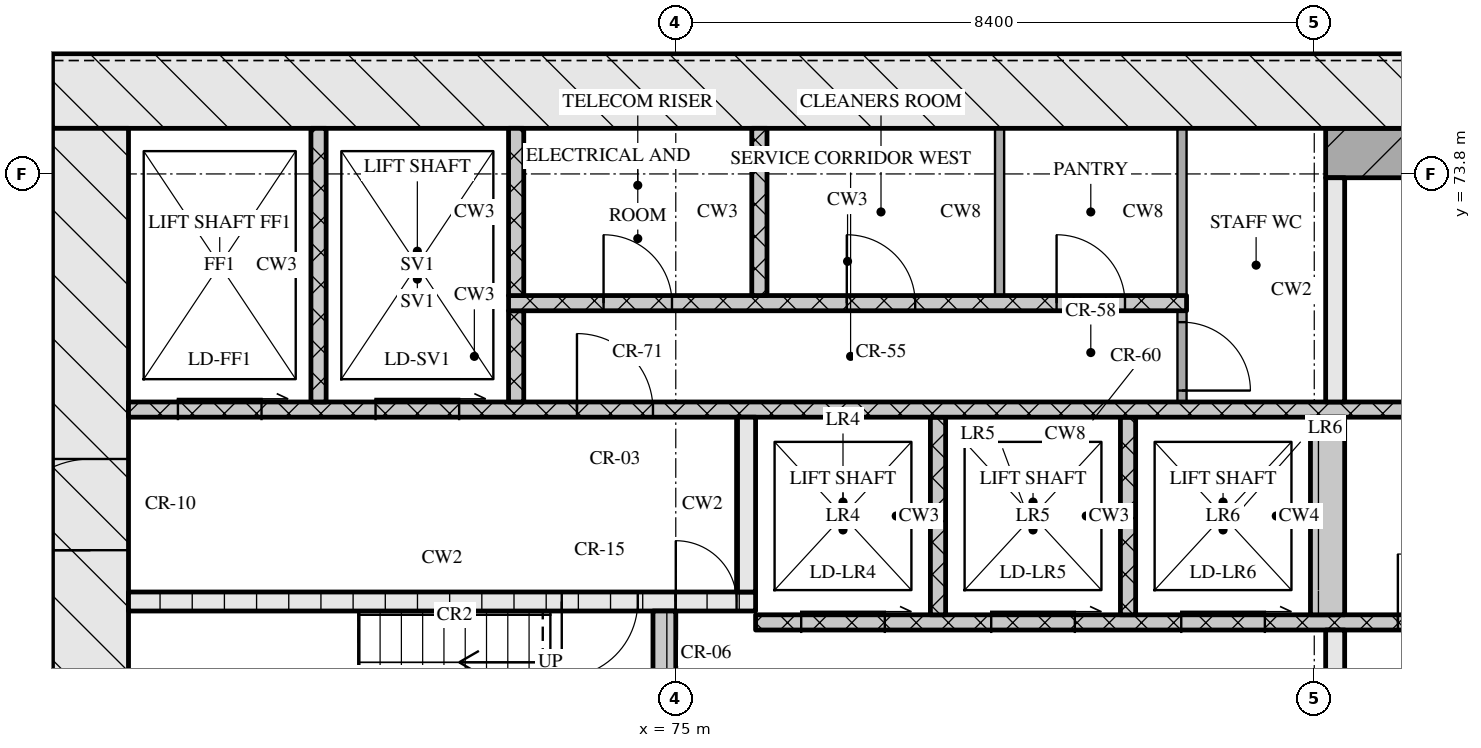
"""IFC4 building model, lengths in metres.
Left out: names, types, materials, properties, quantities, classifications, styles, units other than length and angle.
Written with IfcOpenShell. Run it as: python <this file> out.ifc"""

import sys

from ifc_helpers import new_model, si_unit, direction, frame, frame_2d, origin, place, context, subcontext, project, spatial, rectangle, extrude, element, fill, save


model = new_model("IFC4")
c1 = context("Model", 3, precision=1e-05, world=origin(), true_north=direction((0.0, 1.0)))
c2 = subcontext(c1, "Body", "Model", "MODEL_VIEW")
j1 = project(units=[si_unit("LENGTHUNIT", "METRE"), si_unit("PLANEANGLEUNIT", "RADIAN")], contexts=[c1])
p1 = place(None, origin())
s1 = spatial("IfcSite", under=j1, at=p1, CompositionType="ELEMENT")
p2 = place(p1, origin())
s2 = spatial("IfcBuilding", under=s1, at=p2, CompositionType="ELEMENT")
p3 = place(p2, frame((0.0, 0.0, 102.45)))
s3 = spatial("IfcBuildingStorey", under=s2, at=p3, CompositionType="ELEMENT", Elevation=102.45)
p4 = place(p3, frame((66.8, 74.9, 0.0), z_axis=(0.0, 0.0, 1.0), x_axis=(1.0, 0.0, 0.0)))
e1 = element("IfcWall", 1, at=p4, inside=s3, PredefinedType="SOLIDWALL", context=c2, shape_type="SweptSolid", body=[
    extrude(rectangle(XDim=41.6, YDim=1.0, at=frame_2d((20.8, 0.0))), origin(), (0.0, 0.0, 1.0), 3.32),
])
p5 = place(p3, frame((67.3, 62.4, 0.0), z_axis=(0.0, 0.0, 1.0), x_axis=(0.0, 1.0, 0.0)))
e2 = element("IfcWall", 2, at=p5, inside=s3, PredefinedType="SOLIDWALL", context=c2, shape_type="SweptSolid", body=[
    extrude(rectangle(XDim=12.0, YDim=1.0, at=frame_2d((6.0, 0.0))), origin(), (0.0, 0.0, 1.0), 3.32),
])
p6 = place(p5, frame((6.45, 0.0, 0.0)))
e3 = element("IfcOpeningElement", 3, at=p6, cuts=e2, PredefinedType="OPENING", context=c2, shape_type="SweptSolid", body=[
    extrude(rectangle(XDim=1.2, YDim=2.1, at=frame_2d((0.6, 1.05))), frame((0.0, 0.51, 0.0), z_axis=(0.0, -1.0, 0.0), x_axis=(1.0, 0.0, 0.0)), (0.0, 0.0, 1.0), 1.02),
])
p7 = place(p3, frame((74.85, 65.2, 0.0), z_axis=(0.0, 0.0, 1.0), x_axis=(0.0, 1.0, 0.0)))
e4 = element("IfcWall", 4, at=p7, inside=s3, PredefinedType="SOLIDWALL", context=c2, shape_type="SweptSolid", body=[
    extrude(rectangle(XDim=2.85, YDim=0.3, at=frame_2d((1.425, 0.0))), origin(), (0.0, 0.0, 1.0), 3.32),
])
p8 = place(p3, frame((83.675, 65.2, 0.0), z_axis=(0.0, 0.0, 1.0), x_axis=(0.0, 1.0, 0.0)))
e5 = element("IfcWall", 5, at=p8, inside=s3, PredefinedType="SOLIDWALL", context=c2, shape_type="SweptSolid", body=[
    extrude(rectangle(XDim=2.6, YDim=0.25, at=frame_2d((1.3, 0.0))), origin(), (0.0, 0.0, 1.0), 3.32),
])
p9 = place(p8, frame((0.7, 0.0, 0.0)))
e6 = element("IfcOpeningElement", 6, at=p9, cuts=e5, PredefinedType="OPENING", context=c2, shape_type="SweptSolid", body=[
    extrude(rectangle(XDim=1.2, YDim=2.1, at=frame_2d((0.6, 1.05))), frame((0.0, 0.135, 0.0), z_axis=(0.0, -1.0, 0.0), x_axis=(1.0, 0.0, 0.0)), (0.0, 0.0, 1.0), 0.27),
])
p10 = place(p3, frame((76.05, 67.9, 0.0), z_axis=(0.0, 0.0, 1.0), x_axis=(1.0, 0.0, 0.0)))
e7 = element("IfcWall", 7, at=p10, inside=s3, PredefinedType="SOLIDWALL", context=c2, shape_type="SweptSolid", body=[
    extrude(rectangle(XDim=23.1, YDim=0.2, at=frame_2d((11.55, 0.0))), origin(), (0.0, 0.0, 1.0), 3.32),
])
p11 = place(p10, frame((0.6, 0.0, 0.0)))
e8 = element("IfcOpeningElement", 8, at=p11, cuts=e7, PredefinedType="OPENING", context=c2, shape_type="SweptSolid", body=[
    extrude(rectangle(XDim=1.1, YDim=2.1, at=frame_2d((0.55, 1.05))), frame((0.0, 0.11, 0.0), z_axis=(0.0, -1.0, 0.0), x_axis=(1.0, 0.0, 0.0)), (0.0, 0.0, 1.0), 0.22),
])
p12 = place(p10, frame((3.1, 0.0, 0.0)))
e9 = element("IfcOpeningElement", 9, at=p12, cuts=e7, PredefinedType="OPENING", context=c2, shape_type="SweptSolid", body=[
    extrude(rectangle(XDim=1.1, YDim=2.1, at=frame_2d((0.55, 1.05))), frame((0.0, 0.11, 0.0), z_axis=(0.0, -1.0, 0.0), x_axis=(1.0, 0.0, 0.0)), (0.0, 0.0, 1.0), 0.22),
])
p13 = place(p10, frame((5.6, 0.0, 0.0)))
e10 = element("IfcOpeningElement", 10, at=p13, cuts=e7, PredefinedType="OPENING", context=c2, shape_type="SweptSolid", body=[
    extrude(rectangle(XDim=1.1, YDim=2.1, at=frame_2d((0.55, 1.05))), frame((0.0, 0.11, 0.0), z_axis=(0.0, -1.0, 0.0), x_axis=(1.0, 0.0, 0.0)), (0.0, 0.0, 1.0), 0.22),
])
p14 = place(p10, frame((8.45, 0.0, 0.0)))
e11 = element("IfcOpeningElement", 11, at=p14, cuts=e7, PredefinedType="OPENING", context=c2, shape_type="SweptSolid", body=[
    extrude(rectangle(XDim=0.9, YDim=2.1, at=frame_2d((0.45, 1.05))), frame((0.0, 0.11, 0.0), z_axis=(0.0, -1.0, 0.0), x_axis=(1.0, 0.0, 0.0)), (0.0, 0.0, 1.0), 0.22),
])
p15 = place(p10, frame((10.91, 0.0, 0.0)))
e12 = element("IfcOpeningElement", 12, at=p15, cuts=e7, PredefinedType="OPENING", context=c2, shape_type="SweptSolid", body=[
    extrude(rectangle(XDim=0.9, YDim=2.1, at=frame_2d((0.45, 1.05))), frame((0.0, 0.11, 0.0), z_axis=(0.0, -1.0, 0.0), x_axis=(1.0, 0.0, 0.0)), (0.0, 0.0, 1.0), 0.22),
])
p16 = place(p10, frame((13.55, 0.0, 0.0)))
e13 = element("IfcOpeningElement", 13, at=p16, cuts=e7, PredefinedType="OPENING", context=c2, shape_type="SweptSolid", body=[
    extrude(rectangle(XDim=1.0, YDim=2.1, at=frame_2d((0.5, 1.05))), frame((0.0, 0.11, 0.0), z_axis=(0.0, -1.0, 0.0), x_axis=(1.0, 0.0, 0.0)), (0.0, 0.0, 1.0), 0.22),
])
for number, where, z_axis, x_axis in (
    (14, (78.45, 68.0, 0.0), (0.0, 0.0, 1.0), (0.0, 1.0, 0.0)),
    (15, (80.95, 68.0, 0.0), (0.0, 0.0, 1.0), (0.0, 1.0, 0.0)),
):
    element("IfcWall", number, at=place(p3, frame(where, z_axis=z_axis, x_axis=x_axis)), inside=s3, PredefinedType="SOLIDWALL", context=c2, shape_type="SweptSolid", body=[
        extrude(rectangle(XDim=2.6, YDim=0.2, at=frame_2d((1.3, 0.0))), origin(), (0.0, 0.0, 1.0), 3.32),
    ])
p17 = place(p3, frame((83.575, 68.0, 0.0), z_axis=(0.0, 0.0, 1.0), x_axis=(0.0, 1.0, 0.0)))
e16 = element("IfcWall", 16, at=p17, inside=s3, PredefinedType="SOLIDWALL", context=c2, shape_type="SweptSolid", body=[
    extrude(rectangle(XDim=2.6, YDim=0.45, at=frame_2d((1.3, 0.0))), origin(), (0.0, 0.0, 1.0), 3.32),
])
p18 = place(p3, frame((67.8, 68.175, 0.0), z_axis=(0.0, 0.0, 1.0), x_axis=(1.0, 0.0, 0.0)))
e17 = element("IfcWall", 17, at=p18, inside=s3, PredefinedType="SOLIDWALL", context=c2, shape_type="SweptSolid", body=[
    extrude(rectangle(XDim=8.25, YDim=0.25, at=frame_2d((4.125, 0.0))), origin(), (0.0, 0.0, 1.0), 3.32),
])
p19 = place(p18, frame((5.7, 0.0, 0.0)))
e18 = element("IfcOpeningElement", 18, at=p19, cuts=e17, PredefinedType="OPENING", context=c2, shape_type="SweptSolid", body=[
    extrude(rectangle(XDim=1.0, YDim=2.1, at=frame_2d((0.5, 1.05))), frame((0.0, 0.135, 0.0), z_axis=(0.0, -1.0, 0.0), x_axis=(1.0, 0.0, 0.0)), (0.0, 0.0, 1.0), 0.27),
])
p20 = place(p18, frame((7.2, 0.0, 0.0)))
e19 = element("IfcOpeningElement", 19, at=p20, cuts=e17, PredefinedType="OPENING", context=c2, shape_type="SweptSolid", body=[
    extrude(rectangle(XDim=0.8, YDim=2.1, at=frame_2d((0.4, 1.05))), frame((0.0, 0.135, 0.0), z_axis=(0.0, -1.0, 0.0), x_axis=(1.0, 0.0, 0.0)), (0.0, 0.0, 1.0), 0.27),
])
p21 = place(p3, frame((75.925, 68.3, 0.0), z_axis=(0.0, 0.0, 1.0), x_axis=(0.0, 1.0, 0.0)))
e20 = element("IfcWall", 20, at=p21, inside=s3, PredefinedType="SOLIDWALL", context=c2, shape_type="SweptSolid", body=[
    extrude(rectangle(XDim=2.3, YDim=0.25, at=frame_2d((1.15, 0.0))), origin(), (0.0, 0.0, 1.0), 3.32),
])
p22 = place(p3, frame((67.8, 70.7, 0.0), z_axis=(0.0, 0.0, 1.0), x_axis=(1.0, 0.0, 0.0)))
e21 = element("IfcWall", 21, at=p22, inside=s3, PredefinedType="SOLIDWALL", context=c2, shape_type="SweptSolid", body=[
    extrude(rectangle(XDim=39.6, YDim=0.2, at=frame_2d((19.8, 0.0))), origin(), (0.0, 0.0, 1.0), 3.32),
])
p23 = place(p22, frame((0.65, 0.0, 0.0)))
e22 = element("IfcOpeningElement", 22, at=p23, cuts=e21, PredefinedType="OPENING", context=c2, shape_type="SweptSolid", body=[
    extrude(rectangle(XDim=1.1, YDim=2.1, at=frame_2d((0.55, 1.05))), frame((0.0, 0.11, 0.0), z_axis=(0.0, -1.0, 0.0), x_axis=(1.0, 0.0, 0.0)), (0.0, 0.0, 1.0), 0.22),
])
p24 = place(p22, frame((3.25, 0.0, 0.0)))
e23 = element("IfcOpeningElement", 23, at=p24, cuts=e21, PredefinedType="OPENING", context=c2, shape_type="SweptSolid", body=[
    extrude(rectangle(XDim=1.1, YDim=2.1, at=frame_2d((0.55, 1.05))), frame((0.0, 0.11, 0.0), z_axis=(0.0, -1.0, 0.0), x_axis=(1.0, 0.0, 0.0)), (0.0, 0.0, 1.0), 0.22),
])
p25 = place(p22, frame((5.9, 0.0, 0.0)))
e24 = element("IfcOpeningElement", 24, at=p25, cuts=e21, PredefinedType="OPENING", context=c2, shape_type="SweptSolid", body=[
    extrude(rectangle(XDim=1.0, YDim=2.1, at=frame_2d((0.5, 1.05))), frame((0.0, 0.11, 0.0), z_axis=(0.0, -1.0, 0.0), x_axis=(1.0, 0.0, 0.0)), (0.0, 0.0, 1.0), 0.22),
])
p26 = place(p22, frame((21.7, 0.0, 0.0)))
e25 = element("IfcOpeningElement", 25, at=p26, cuts=e21, PredefinedType="OPENING", context=c2, shape_type="SweptSolid", body=[
    extrude(rectangle(XDim=1.0, YDim=2.1, at=frame_2d((0.5, 1.05))), frame((0.0, 0.11, 0.0), z_axis=(0.0, -1.0, 0.0), x_axis=(1.0, 0.0, 0.0)), (0.0, 0.0, 1.0), 0.22),
])
p27 = place(p22, frame((32.7, 0.0, 0.0)))
e26 = element("IfcOpeningElement", 26, at=p27, cuts=e21, PredefinedType="OPENING", context=c2, shape_type="SweptSolid", body=[
    extrude(rectangle(XDim=1.0, YDim=2.1, at=frame_2d((0.5, 1.05))), frame((0.0, 0.11, 0.0), z_axis=(0.0, -1.0, 0.0), x_axis=(1.0, 0.0, 0.0)), (0.0, 0.0, 1.0), 0.22),
])
p28 = place(p22, frame((35.25, 0.0, 0.0)))
e27 = element("IfcOpeningElement", 27, at=p28, cuts=e21, PredefinedType="OPENING", context=c2, shape_type="SweptSolid", body=[
    extrude(rectangle(XDim=1.1, YDim=2.1, at=frame_2d((0.55, 1.05))), frame((0.0, 0.11, 0.0), z_axis=(0.0, -1.0, 0.0), x_axis=(1.0, 0.0, 0.0)), (0.0, 0.0, 1.0), 0.22),
])
p29 = place(p22, frame((37.85, 0.0, 0.0)))
e28 = element("IfcOpeningElement", 28, at=p29, cuts=e21, PredefinedType="OPENING", context=c2, shape_type="SweptSolid", body=[
    extrude(rectangle(XDim=1.1, YDim=2.1, at=frame_2d((0.55, 1.05))), frame((0.0, 0.11, 0.0), z_axis=(0.0, -1.0, 0.0), x_axis=(1.0, 0.0, 0.0)), (0.0, 0.0, 1.0), 0.22),
])
p30 = place(p3, frame((70.3, 70.8, 0.0), z_axis=(0.0, 0.0, 1.0), x_axis=(0.0, 1.0, 0.0)))
e29 = element("IfcWall", 29, at=p30, inside=s3, PredefinedType="SOLIDWALL", context=c2, shape_type="SweptSolid", body=[
    extrude(rectangle(XDim=3.6, YDim=0.2, at=frame_2d((1.8, 0.0))), origin(), (0.0, 0.0, 1.0), 3.32),
])
p31 = place(p3, frame((72.9, 70.8, 0.0), z_axis=(0.0, 0.0, 1.0), x_axis=(0.0, 1.0, 0.0)))
e30 = element("IfcWall", 30, at=p31, inside=s3, PredefinedType="SOLIDWALL", context=c2, shape_type="SweptSolid", body=[
    extrude(rectangle(XDim=1.2, YDim=0.2, at=frame_2d((0.6, 0.0))), origin(), (0.0, 0.0, 1.0), 3.32),
])
p32 = place(p3, frame((81.66, 70.8, 0.0), z_axis=(0.0, 0.0, 1.0), x_axis=(0.0, 1.0, 0.0)))
e31 = element("IfcWall", 31, at=p32, inside=s3, PredefinedType="PARTITIONING", context=c2, shape_type="SweptSolid", body=[
    extrude(rectangle(XDim=1.2, YDim=0.12, at=frame_2d((0.6, 0.0))), origin(), (0.0, 0.0, 1.0), 3.32),
])
p33 = place(p32, frame((0.15, 0.0, 0.0)))
e32 = element("IfcOpeningElement", 32, at=p33, cuts=e31, PredefinedType="OPENING", context=c2, shape_type="SweptSolid", body=[
    extrude(rectangle(XDim=0.9, YDim=2.1, at=frame_2d((0.45, 1.05))), frame((0.0, 0.07, 0.0), z_axis=(0.0, -1.0, 0.0), x_axis=(1.0, 0.0, 0.0)), (0.0, 0.0, 1.0), 0.14),
])
p34 = place(p3, frame((83.675, 70.8, 0.0), z_axis=(0.0, 0.0, 1.0), x_axis=(0.0, 1.0, 0.0)))
e33 = element("IfcWall", 33, at=p34, inside=s3, PredefinedType="SOLIDWALL", context=c2, shape_type="SweptSolid", body=[
    extrude(rectangle(XDim=2.95, YDim=0.25, at=frame_2d((1.475, 0.0))), origin(), (0.0, 0.0, 1.0), 3.32),
])
p35 = place(p3, frame((72.8, 72.1, 0.0), z_axis=(0.0, 0.0, 1.0), x_axis=(1.0, 0.0, 0.0)))
e34 = element("IfcWall", 34, at=p35, inside=s3, PredefinedType="SOLIDWALL", context=c2, shape_type="SweptSolid", body=[
    extrude(rectangle(XDim=8.92, YDim=0.2, at=frame_2d((4.46, 0.0))), origin(), (0.0, 0.0, 1.0), 3.32),
])
p36 = place(p35, frame((1.25, 0.0, 0.0)))
e35 = element("IfcOpeningElement", 35, at=p36, cuts=e34, PredefinedType="OPENING", context=c2, shape_type="SweptSolid", body=[
    extrude(rectangle(XDim=0.9, YDim=2.1, at=frame_2d((0.45, 1.05))), frame((0.0, 0.11, 0.0), z_axis=(0.0, -1.0, 0.0), x_axis=(1.0, 0.0, 0.0)), (0.0, 0.0, 1.0), 0.22),
])
p37 = place(p35, frame((4.45, 0.0, 0.0)))
e36 = element("IfcOpeningElement", 36, at=p37, cuts=e34, PredefinedType="OPENING", context=c2, shape_type="SweptSolid", body=[
    extrude(rectangle(XDim=0.9, YDim=2.1, at=frame_2d((0.45, 1.05))), frame((0.0, 0.11, 0.0), z_axis=(0.0, -1.0, 0.0), x_axis=(1.0, 0.0, 0.0)), (0.0, 0.0, 1.0), 0.22),
])
p38 = place(p35, frame((7.21, 0.0, 0.0)))
e37 = element("IfcOpeningElement", 37, at=p38, cuts=e34, PredefinedType="OPENING", context=c2, shape_type="SweptSolid", body=[
    extrude(rectangle(XDim=0.9, YDim=2.1, at=frame_2d((0.45, 1.05))), frame((0.0, 0.11, 0.0), z_axis=(0.0, -1.0, 0.0), x_axis=(1.0, 0.0, 0.0)), (0.0, 0.0, 1.0), 0.22),
])
for number, where, z_axis, x_axis in (
    (38, (72.9, 72.2, 0.0), (0.0, 0.0, 1.0), (0.0, 1.0, 0.0)),
    (39, (76.1, 72.2, 0.0), (0.0, 0.0, 1.0), (0.0, 1.0, 0.0)),
):
    element("IfcWall", number, at=place(p3, frame(where, z_axis=z_axis, x_axis=x_axis)), inside=s3, PredefinedType="SOLIDWALL", context=c2, shape_type="SweptSolid", body=[
        extrude(rectangle(XDim=2.2, YDim=0.2, at=frame_2d((1.1, 0.0))), origin(), (0.0, 0.0, 1.0), 3.32),
    ])
for number, where, z_axis, x_axis in (
    (40, (79.26, 72.2, 0.0), (0.0, 0.0, 1.0), (0.0, 1.0, 0.0)),
    (41, (81.66, 72.2, 0.0), (0.0, 0.0, 1.0), (0.0, 1.0, 0.0)),
):
    element("IfcWall", number, at=place(p3, frame(where, z_axis=z_axis, x_axis=x_axis)), inside=s3, PredefinedType="PARTITIONING", context=c2, shape_type="SweptSolid", body=[
        extrude(rectangle(XDim=2.2, YDim=0.12, at=frame_2d((1.1, 0.0))), origin(), (0.0, 0.0, 1.0), 3.32),
    ])
p39 = place(p3, frame((83.55, 74.075, 0.0), z_axis=(0.0, 0.0, 1.0), x_axis=(1.0, 0.0, 0.0)))
e42 = element("IfcWall", 42, at=p39, inside=s3, PredefinedType="SOLIDWALL", context=c2, shape_type="SweptSolid", body=[
    extrude(rectangle(XDim=8.1, YDim=0.65, at=frame_2d((4.05, 0.0))), origin(), (0.0, 0.0, 1.0), 3.32),
])
p40 = place(p11, origin())
e43 = element("IfcDoor", 43, at=p40, inside=s3, OperationType="SLIDING_TO_RIGHT", PredefinedType="DOOR", context=c2, shape_type="SweptSolid", body=[
    extrude(rectangle(XDim=1.1, YDim=2.1, at=frame_2d((0.55, 1.05))), frame((0.0, 0.025, 0.0), z_axis=(0.0, -1.0, 0.0), x_axis=(1.0, 0.0, 0.0)), (0.0, 0.0, 1.0), 0.05),
])
fill(e8, e43)
p41 = place(p12, origin())
e44 = element("IfcDoor", 44, at=p41, inside=s3, OperationType="SLIDING_TO_RIGHT", PredefinedType="DOOR", context=c2, shape_type="SweptSolid", body=[
    extrude(rectangle(XDim=1.1, YDim=2.1, at=frame_2d((0.55, 1.05))), frame((0.0, 0.025, 0.0), z_axis=(0.0, -1.0, 0.0), x_axis=(1.0, 0.0, 0.0)), (0.0, 0.0, 1.0), 0.05),
])
fill(e9, e44)
p42 = place(p13, origin())
e45 = element("IfcDoor", 45, at=p42, inside=s3, OperationType="SLIDING_TO_RIGHT", PredefinedType="DOOR", context=c2, shape_type="SweptSolid", body=[
    extrude(rectangle(XDim=1.1, YDim=2.1, at=frame_2d((0.55, 1.05))), frame((0.0, 0.025, 0.0), z_axis=(0.0, -1.0, 0.0), x_axis=(1.0, 0.0, 0.0)), (0.0, 0.0, 1.0), 0.05),
])
fill(e10, e45)
p43 = place(p14, origin())
e46 = element("IfcDoor", 46, at=p43, inside=s3, OperationType="SINGLE_SWING_LEFT", PredefinedType="DOOR", context=c2, shape_type="SweptSolid", body=[
    extrude(rectangle(XDim=0.9, YDim=2.1, at=frame_2d((0.45, 1.05))), frame((0.0, 0.025, 0.0), z_axis=(0.0, -1.0, 0.0), x_axis=(1.0, 0.0, 0.0)), (0.0, 0.0, 1.0), 0.05),
])
fill(e11, e46)
p44 = place(p19, origin())
e47 = element("IfcDoor", 47, at=p44, inside=s3, OperationType="SINGLE_SWING_RIGHT", PredefinedType="DOOR", context=c2, shape_type="SweptSolid", body=[
    extrude(rectangle(XDim=1.0, YDim=2.1, at=frame_2d((0.5, 1.05))), frame((0.0, 0.025, 0.0), z_axis=(0.0, -1.0, 0.0), x_axis=(1.0, 0.0, 0.0)), (0.0, 0.0, 1.0), 0.05),
])
fill(e18, e47)
p45 = place(p20, origin())
e48 = element("IfcDoor", 48, at=p45, inside=s3, OperationType="SINGLE_SWING_LEFT", PredefinedType="DOOR", context=c2, shape_type="SweptSolid", body=[
    extrude(rectangle(XDim=0.8, YDim=2.1, at=frame_2d((0.4, 1.05))), frame((0.0, 0.025, 0.0), z_axis=(0.0, -1.0, 0.0), x_axis=(1.0, 0.0, 0.0)), (0.0, 0.0, 1.0), 0.05),
])
fill(e19, e48)
p46 = place(p6, origin())
e49 = element("IfcDoor", 49, at=p46, inside=s3, OperationType="SINGLE_SWING_LEFT", PredefinedType="DOOR", context=c2, shape_type="SweptSolid", body=[
    extrude(rectangle(XDim=1.2, YDim=2.1, at=frame_2d((0.6, 1.05))), frame((0.0, 0.025, 0.0), z_axis=(0.0, -1.0, 0.0), x_axis=(1.0, 0.0, 0.0)), (0.0, 0.0, 1.0), 0.05),
])
fill(e3, e49)
p47 = place(p23, origin())
e50 = element("IfcDoor", 50, at=p47, inside=s3, OperationType="SLIDING_TO_RIGHT", PredefinedType="DOOR", context=c2, shape_type="SweptSolid", body=[
    extrude(rectangle(XDim=1.1, YDim=2.1, at=frame_2d((0.55, 1.05))), frame((0.0, 0.025, 0.0), z_axis=(0.0, -1.0, 0.0), x_axis=(1.0, 0.0, 0.0)), (0.0, 0.0, 1.0), 0.05),
])
fill(e22, e50)
p48 = place(p24, origin())
e51 = element("IfcDoor", 51, at=p48, inside=s3, OperationType="SLIDING_TO_RIGHT", PredefinedType="DOOR", context=c2, shape_type="SweptSolid", body=[
    extrude(rectangle(XDim=1.1, YDim=2.1, at=frame_2d((0.55, 1.05))), frame((0.0, 0.025, 0.0), z_axis=(0.0, -1.0, 0.0), x_axis=(1.0, 0.0, 0.0)), (0.0, 0.0, 1.0), 0.05),
])
fill(e23, e51)
p49 = place(p25, origin())
e52 = element("IfcDoor", 52, at=p49, inside=s3, OperationType="SINGLE_SWING_LEFT", PredefinedType="DOOR", context=c2, shape_type="SweptSolid", body=[
    extrude(rectangle(XDim=1.0, YDim=2.1, at=frame_2d((0.5, 1.05))), frame((0.0, 0.025, 0.0), z_axis=(0.0, -1.0, 0.0), x_axis=(1.0, 0.0, 0.0)), (0.0, 0.0, 1.0), 0.05),
])
fill(e24, e52)
p50 = place(p33, origin())
e53 = element("IfcDoor", 53, at=p50, inside=s3, OperationType="SINGLE_SWING_RIGHT", PredefinedType="DOOR", context=c2, shape_type="SweptSolid", body=[
    extrude(rectangle(XDim=0.9, YDim=2.1, at=frame_2d((0.45, 1.05))), frame((0.0, 0.025, 0.0), z_axis=(0.0, -1.0, 0.0), x_axis=(1.0, 0.0, 0.0)), (0.0, 0.0, 1.0), 0.05),
])
fill(e32, e53)
p51 = place(p36, origin())
e54 = element("IfcDoor", 54, at=p51, inside=s3, OperationType="SINGLE_SWING_LEFT", PredefinedType="DOOR", context=c2, shape_type="SweptSolid", body=[
    extrude(rectangle(XDim=0.9, YDim=2.1, at=frame_2d((0.45, 1.05))), frame((0.0, 0.025, 0.0), z_axis=(0.0, -1.0, 0.0), x_axis=(1.0, 0.0, 0.0)), (0.0, 0.0, 1.0), 0.05),
])
fill(e35, e54)
p52 = place(p37, origin())
e55 = element("IfcDoor", 55, at=p52, inside=s3, OperationType="SINGLE_SWING_LEFT", PredefinedType="DOOR", context=c2, shape_type="SweptSolid", body=[
    extrude(rectangle(XDim=0.9, YDim=2.1, at=frame_2d((0.45, 1.05))), frame((0.0, 0.025, 0.0), z_axis=(0.0, -1.0, 0.0), x_axis=(1.0, 0.0, 0.0)), (0.0, 0.0, 1.0), 0.05),
])
fill(e36, e55)
p53 = place(p38, origin())
e56 = element("IfcDoor", 56, at=p53, inside=s3, OperationType="SINGLE_SWING_LEFT", PredefinedType="DOOR", context=c2, shape_type="SweptSolid", body=[
    extrude(rectangle(XDim=0.9, YDim=2.1, at=frame_2d((0.45, 1.05))), frame((0.0, 0.025, 0.0), z_axis=(0.0, -1.0, 0.0), x_axis=(1.0, 0.0, 0.0)), (0.0, 0.0, 1.0), 0.05),
])
fill(e37, e56)
save(model, sys.argv[1])
